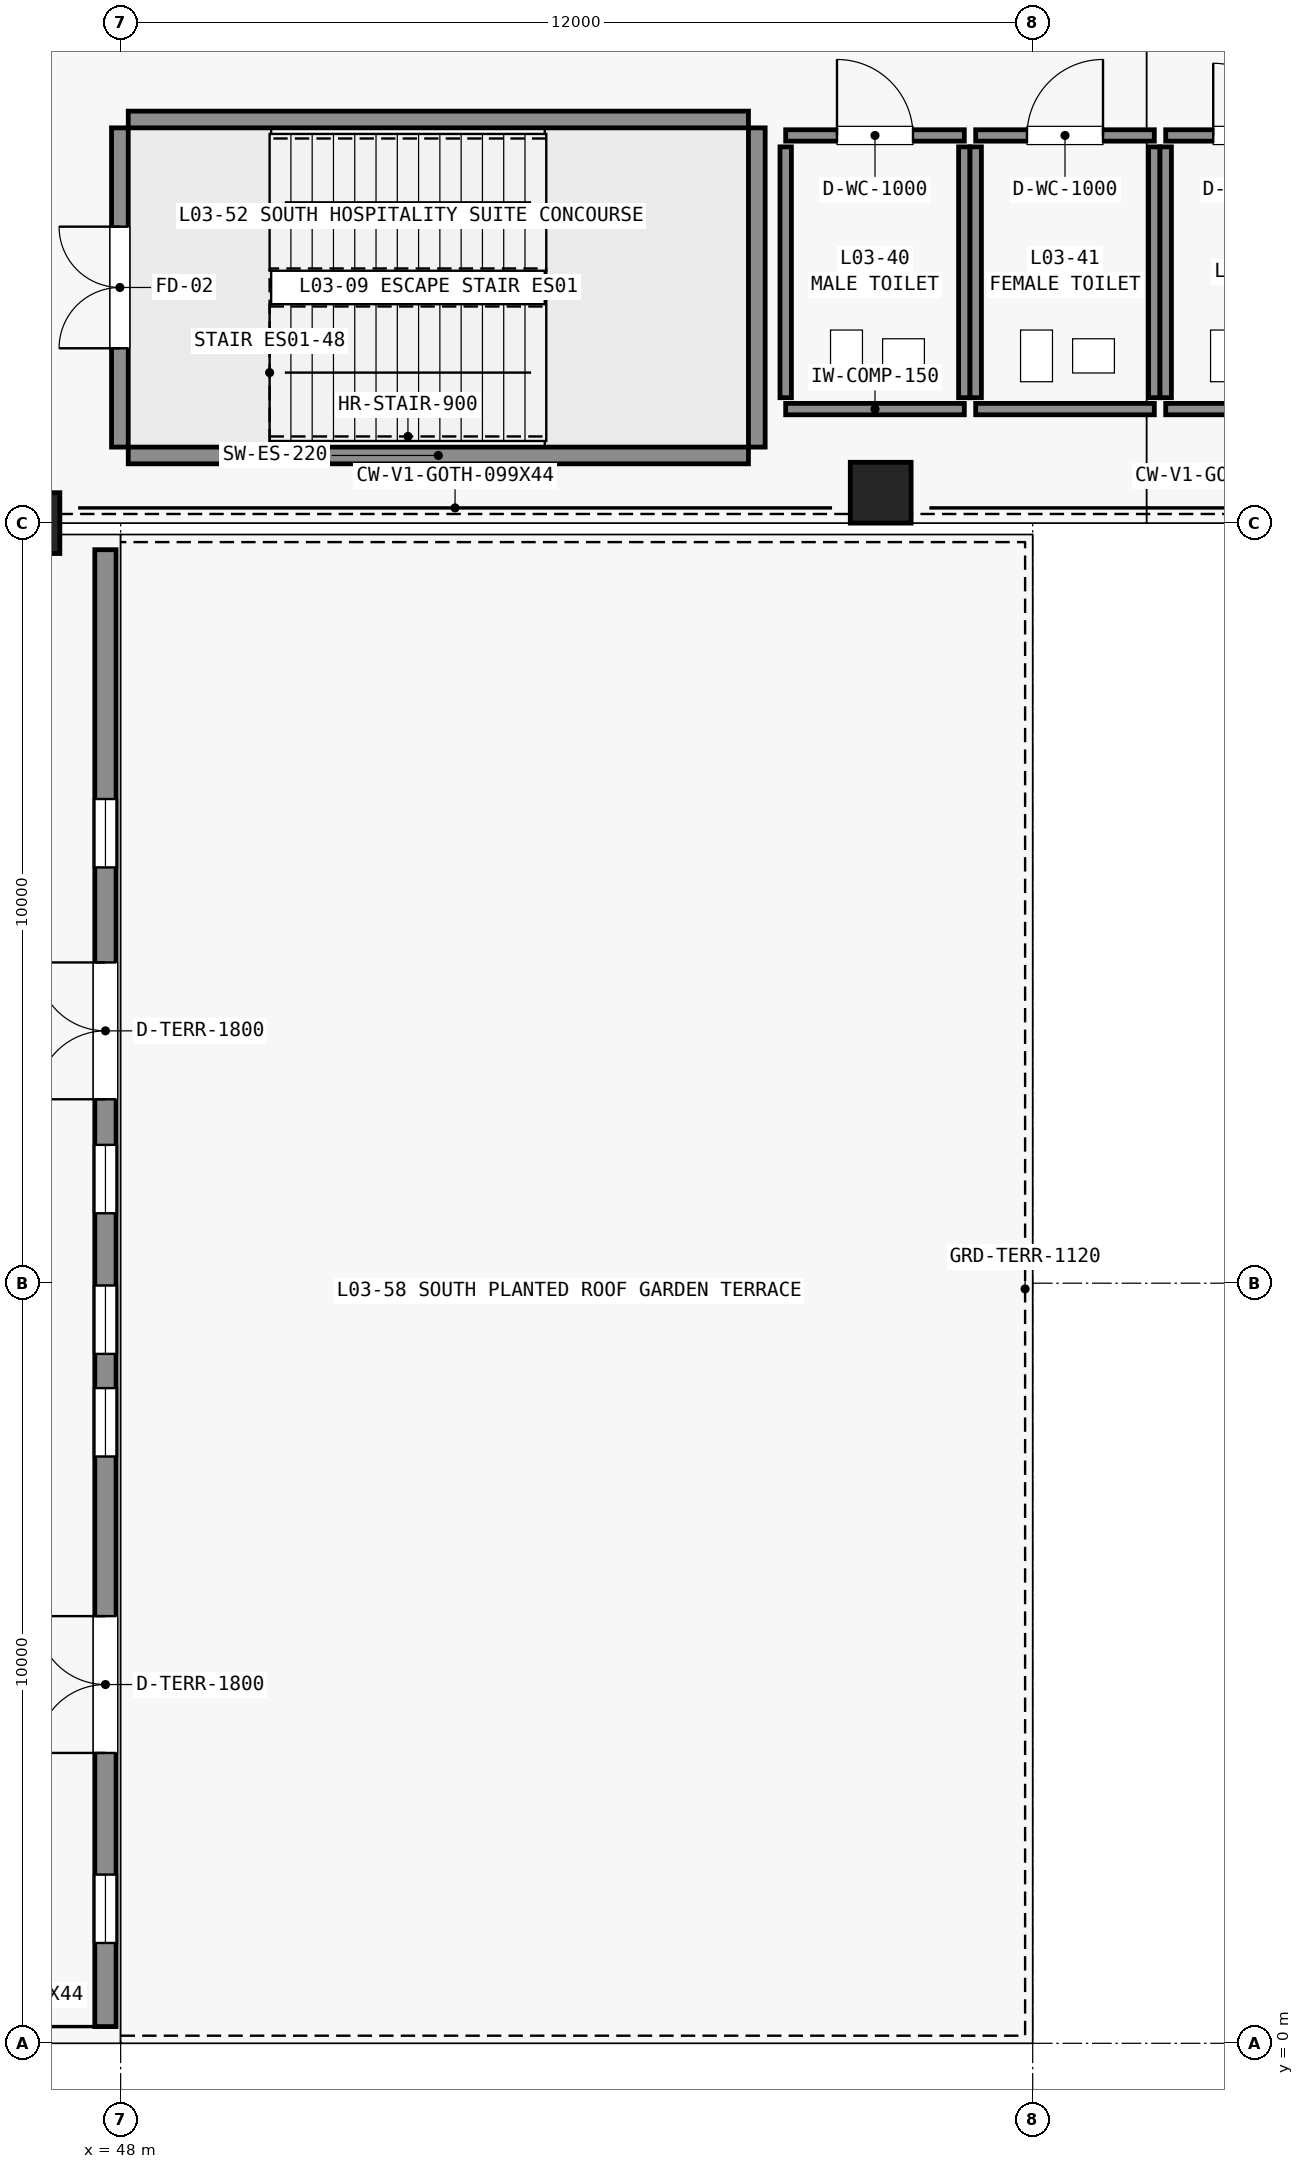
"""IFC4 building model, lengths in metres.
Left out: names, types, materials, properties, quantities, classifications, styles, units other than length and angle.
Written with IfcOpenShell. Run it as: python <this file> out.ifc"""

import sys

from ifc_helpers import new_model, si_unit, direction, frame, frame_2d, origin, origin_2d, place, context, subcontext, project, spatial, rectangle, extrude, element, fill, save


model = new_model("IFC4")
c1 = context("Model", 3, precision=1e-05, world=origin(), true_north=direction((0.0, 1.0)))
c2 = subcontext(c1, "Body", "Model", "MODEL_VIEW")
j1 = project(units=[si_unit("LENGTHUNIT", "METRE"), si_unit("PLANEANGLEUNIT", "RADIAN")], contexts=[c1])
p1 = place(None, origin())
s1 = spatial("IfcSite", under=j1, at=p1, CompositionType="ELEMENT")
p2 = place(p1, origin())
s2 = spatial("IfcBuilding", under=s1, at=p2, CompositionType="ELEMENT")
p3 = place(p2, frame((0.0, 0.0, 16.2)))
s3 = spatial("IfcBuildingStorey", under=s2, at=p3, CompositionType="ELEMENT", Elevation=16.2)
p4 = place(p3, frame((58.0, 20.4, 0.0), z_axis=(0.0, 0.0, 1.0), x_axis=(1.0, 0.0, 0.0)))
e1 = element("IfcColumn", 1, at=p4, inside=s3, PredefinedType="PILASTER", context=c2, shape_type="SweptSolid", body=[
    extrude(rectangle(XDim=0.8, YDim=0.8, at=origin_2d()), origin(), (0.0, 0.0, 1.0), 4.8),
])
p5 = place(p3, frame((46.8, 20.0, 0.0), z_axis=(0.0, 0.0, 1.0), x_axis=(1.0, 0.0, 0.0)))
e2 = element("IfcColumn", 2, at=p5, inside=s3, PredefinedType="PILASTER", context=c2, shape_type="SweptSolid", body=[
    extrude(rectangle(XDim=0.8, YDim=0.8, at=origin_2d()), origin(), (0.0, 0.0, 1.0), 4.44),
])
p6 = place(p3, frame((47.8, 0.22, 0.0), z_axis=(0.0, 0.0, 1.0), x_axis=(0.0, 1.0, 0.0)))
e3 = element("IfcWall", 3, at=p6, inside=s3, PredefinedType="STANDARD", context=c2, shape_type="SweptSolid", body=[
    extrude(rectangle(XDim=19.43, YDim=0.28, at=frame_2d((9.715, 0.0))), origin(), (0.0, 0.0, 1.0), 4.44),
])
p7 = place(p6, frame((3.6, 0.0, 0.0)))
e4 = element("IfcOpeningElement", 4, at=p7, cuts=e3, PredefinedType="OPENING", context=c2, shape_type="SweptSolid", body=[
    extrude(rectangle(XDim=1.8, YDim=2.3, at=frame_2d((0.9, 1.15))), frame((0.0, 0.15, 0.0), z_axis=(0.0, -1.0, 0.0), x_axis=(1.0, 0.0, 0.0)), (0.0, 0.0, 1.0), 0.3),
])
p8 = place(p6, frame((12.2, 0.0, 0.0)))
e5 = element("IfcOpeningElement", 5, at=p8, cuts=e3, PredefinedType="OPENING", context=c2, shape_type="SweptSolid", body=[
    extrude(rectangle(XDim=1.8, YDim=2.3, at=frame_2d((0.9, 1.15))), frame((0.0, 0.15, 0.0), z_axis=(0.0, -1.0, 0.0), x_axis=(1.0, 0.0, 0.0)), (0.0, 0.0, 1.0), 0.3),
])
p9 = place(p6, frame((1.1, 0.0, 0.95)))
e6 = element("IfcOpeningElement", 6, at=p9, cuts=e3, PredefinedType="OPENING", context=c2, shape_type="SweptSolid", body=[
    extrude(rectangle(XDim=0.9, YDim=2.85, at=frame_2d((0.45, 1.425))), frame((0.0, 0.15, 0.0), z_axis=(0.0, -1.0, 0.0), x_axis=(1.0, 0.0, 0.0)), (0.0, 0.0, 1.0), 0.3),
])
p10 = place(p6, frame((7.5, 0.0, 0.95)))
e7 = element("IfcOpeningElement", 7, at=p10, cuts=e3, PredefinedType="OPENING", context=c2, shape_type="SweptSolid", body=[
    extrude(rectangle(XDim=0.9, YDim=2.85, at=frame_2d((0.45, 1.425))), frame((0.0, 0.15, 0.0), z_axis=(0.0, -1.0, 0.0), x_axis=(1.0, 0.0, 0.0)), (0.0, 0.0, 1.0), 0.3),
])
p11 = place(p6, frame((8.85, 0.0, 0.95)))
e8 = element("IfcOpeningElement", 8, at=p11, cuts=e3, PredefinedType="OPENING", context=c2, shape_type="SweptSolid", body=[
    extrude(rectangle(XDim=0.9, YDim=2.85, at=frame_2d((0.45, 1.425))), frame((0.0, 0.15, 0.0), z_axis=(0.0, -1.0, 0.0), x_axis=(1.0, 0.0, 0.0)), (0.0, 0.0, 1.0), 0.3),
])
p12 = place(p6, frame((10.7, 0.0, 0.95)))
e9 = element("IfcOpeningElement", 9, at=p12, cuts=e3, PredefinedType="OPENING", context=c2, shape_type="SweptSolid", body=[
    extrude(rectangle(XDim=0.9, YDim=2.85, at=frame_2d((0.45, 1.425))), frame((0.0, 0.15, 0.0), z_axis=(0.0, -1.0, 0.0), x_axis=(1.0, 0.0, 0.0)), (0.0, 0.0, 1.0), 0.3),
])
p13 = place(p6, frame((15.25, 0.0, 0.95)))
e10 = element("IfcOpeningElement", 10, at=p13, cuts=e3, PredefinedType="OPENING", context=c2, shape_type="SweptSolid", body=[
    extrude(rectangle(XDim=0.9, YDim=2.85, at=frame_2d((0.45, 1.425))), frame((0.0, 0.15, 0.0), z_axis=(0.0, -1.0, 0.0), x_axis=(1.0, 0.0, 0.0)), (0.0, 0.0, 1.0), 0.3),
])
for number, where, z_axis, x_axis in (
    (11, (48.1, 20.89, 0.0), (0.0, 0.0, 1.0), (1.0, 0.0, 0.0)),
    (12, (48.1, 25.31, 0.0), (0.0, 0.0, 1.0), (1.0, 0.0, 0.0)),
):
    element("IfcWall", number, at=place(p3, frame(where, z_axis=z_axis, x_axis=x_axis)), inside=s3, PredefinedType="SHEAR", context=c2, shape_type="SweptSolid", body=[
        extrude(rectangle(XDim=8.16, YDim=0.22, at=frame_2d((4.08, 0.0))), origin(), (0.0, 0.0, 1.0), 4.8),
    ])
p14 = place(p3, frame((47.99, 21.0, 0.0), z_axis=(0.0, 0.0, 1.0), x_axis=(0.0, 1.0, 0.0)))
e13 = element("IfcWall", 13, at=p14, inside=s3, PredefinedType="SHEAR", context=c2, shape_type="SweptSolid", body=[
    extrude(rectangle(XDim=4.2, YDim=0.22, at=frame_2d((2.1, 0.0))), origin(), (0.0, 0.0, 1.0), 4.8),
])
p15 = place(p14, frame((1.3, 0.0, 0.0)))
e14 = element("IfcOpeningElement", 14, at=p15, cuts=e13, PredefinedType="OPENING", context=c2, shape_type="SweptSolid", body=[
    extrude(rectangle(XDim=1.6, YDim=2.2, at=frame_2d((0.8, 1.1))), frame((0.0, 0.12, 0.0), z_axis=(0.0, -1.0, 0.0), x_axis=(1.0, 0.0, 0.0)), (0.0, 0.0, 1.0), 0.24),
])
p16 = place(p3, frame((56.37, 21.0, 0.0), z_axis=(0.0, 0.0, 1.0), x_axis=(0.0, 1.0, 0.0)))
e15 = element("IfcWall", 15, at=p16, inside=s3, PredefinedType="SHEAR", context=c2, shape_type="SweptSolid", body=[
    extrude(rectangle(XDim=4.2, YDim=0.22, at=frame_2d((2.1, 0.0))), origin(), (0.0, 0.0, 1.0), 4.8),
])
p17 = place(p3, frame((56.75, 21.5, 0.0), z_axis=(0.0, 0.0, 1.0), x_axis=(1.0, 0.0, 0.0)))
e16 = element("IfcWall", 16, at=p17, inside=s3, PredefinedType="STANDARD", context=c2, shape_type="SweptSolid", body=[
    extrude(rectangle(XDim=2.35, YDim=0.15, at=frame_2d((1.175, 0.0))), origin(), (0.0, 0.0, 1.0), 4.44),
])
p18 = place(p3, frame((56.75, 25.1, 0.0), z_axis=(0.0, 0.0, 1.0), x_axis=(1.0, 0.0, 0.0)))
e17 = element("IfcWall", 17, at=p18, inside=s3, PredefinedType="STANDARD", context=c2, shape_type="SweptSolid", body=[
    extrude(rectangle(XDim=2.35, YDim=0.15, at=frame_2d((1.175, 0.0))), origin(), (0.0, 0.0, 1.0), 4.44),
])
p19 = place(p18, frame((0.675, 0.0, 0.0)))
e18 = element("IfcOpeningElement", 18, at=p19, cuts=e17, PredefinedType="OPENING", context=c2, shape_type="SweptSolid", body=[
    extrude(rectangle(XDim=1.0, YDim=2.15, at=frame_2d((0.5, 1.075))), frame((0.0, 0.085, 0.0), z_axis=(0.0, -1.0, 0.0), x_axis=(1.0, 0.0, 0.0)), (0.0, 0.0, 1.0), 0.17),
])
for number, where, z_axis, x_axis in (
    (19, (56.75, 21.65, 0.0), (0.0, 0.0, 1.0), (0.0, 1.0, 0.0)),
    (20, (59.1, 21.65, 0.0), (0.0, 0.0, 1.0), (0.0, 1.0, 0.0)),
):
    element("IfcWall", number, at=place(p3, frame(where, z_axis=z_axis, x_axis=x_axis)), inside=s3, PredefinedType="STANDARD", context=c2, shape_type="SweptSolid", body=[
        extrude(rectangle(XDim=3.3, YDim=0.15, at=frame_2d((1.65, 0.0))), origin(), (0.0, 0.0, 1.0), 4.44),
    ])
p20 = place(p3, frame((59.25, 21.5, 0.0), z_axis=(0.0, 0.0, 1.0), x_axis=(1.0, 0.0, 0.0)))
e21 = element("IfcWall", 21, at=p20, inside=s3, PredefinedType="STANDARD", context=c2, shape_type="SweptSolid", body=[
    extrude(rectangle(XDim=2.35, YDim=0.15, at=frame_2d((1.175, 0.0))), origin(), (0.0, 0.0, 1.0), 4.44),
])
p21 = place(p3, frame((59.25, 25.1, 0.0), z_axis=(0.0, 0.0, 1.0), x_axis=(1.0, 0.0, 0.0)))
e22 = element("IfcWall", 22, at=p21, inside=s3, PredefinedType="STANDARD", context=c2, shape_type="SweptSolid", body=[
    extrude(rectangle(XDim=2.35, YDim=0.15, at=frame_2d((1.175, 0.0))), origin(), (0.0, 0.0, 1.0), 4.44),
])
p22 = place(p21, frame((0.675, 0.0, 0.0)))
e23 = element("IfcOpeningElement", 23, at=p22, cuts=e22, PredefinedType="OPENING", context=c2, shape_type="SweptSolid", body=[
    extrude(rectangle(XDim=1.0, YDim=2.15, at=frame_2d((0.5, 1.075))), frame((0.0, 0.085, 0.0), z_axis=(0.0, -1.0, 0.0), x_axis=(1.0, 0.0, 0.0)), (0.0, 0.0, 1.0), 0.17),
])
for number, where, z_axis, x_axis in (
    (24, (59.25, 21.65, 0.0), (0.0, 0.0, 1.0), (0.0, 1.0, 0.0)),
    (25, (61.6, 21.65, 0.0), (0.0, 0.0, 1.0), (0.0, 1.0, 0.0)),
):
    element("IfcWall", number, at=place(p3, frame(where, z_axis=z_axis, x_axis=x_axis)), inside=s3, PredefinedType="STANDARD", context=c2, shape_type="SweptSolid", body=[
        extrude(rectangle(XDim=3.3, YDim=0.15, at=frame_2d((1.65, 0.0))), origin(), (0.0, 0.0, 1.0), 4.44),
    ])
p23 = place(p3, frame((61.75, 21.5, 0.0), z_axis=(0.0, 0.0, 1.0), x_axis=(1.0, 0.0, 0.0)))
e26 = element("IfcWall", 26, at=p23, inside=s3, PredefinedType="STANDARD", context=c2, shape_type="SweptSolid", body=[
    extrude(rectangle(XDim=2.2, YDim=0.15, at=frame_2d((1.1, 0.0))), origin(), (0.0, 0.0, 1.0), 4.44),
])
p24 = place(p3, frame((61.75, 25.1, 0.0), z_axis=(0.0, 0.0, 1.0), x_axis=(1.0, 0.0, 0.0)))
e27 = element("IfcWall", 27, at=p24, inside=s3, PredefinedType="STANDARD", context=c2, shape_type="SweptSolid", body=[
    extrude(rectangle(XDim=2.2, YDim=0.15, at=frame_2d((1.1, 0.0))), origin(), (0.0, 0.0, 1.0), 4.44),
])
p25 = place(p24, frame((0.625, 0.0, 0.0)))
e28 = element("IfcOpeningElement", 28, at=p25, cuts=e27, PredefinedType="OPENING", context=c2, shape_type="SweptSolid", body=[
    extrude(rectangle(XDim=0.95, YDim=2.15, at=frame_2d((0.475, 1.075))), frame((0.0, 0.085, 0.0), z_axis=(0.0, -1.0, 0.0), x_axis=(1.0, 0.0, 0.0)), (0.0, 0.0, 1.0), 0.17),
])
p26 = place(p3, frame((61.75, 21.65, 0.0), z_axis=(0.0, 0.0, 1.0), x_axis=(0.0, 1.0, 0.0)))
e29 = element("IfcWall", 29, at=p26, inside=s3, PredefinedType="STANDARD", context=c2, shape_type="SweptSolid", body=[
    extrude(rectangle(XDim=3.3, YDim=0.15, at=frame_2d((1.65, 0.0))), origin(), (0.0, 0.0, 1.0), 4.44),
])
p27 = place(p7, origin())
e30 = element("IfcDoor", 30, at=p27, inside=s3, OperationType="DOUBLE_DOOR_SINGLE_SWING", PredefinedType="DOOR", context=c2, shape_type="SweptSolid", body=[
    extrude(rectangle(XDim=1.8, YDim=2.3, at=frame_2d((0.9, 1.15))), frame((0.0, 0.025, 0.0), z_axis=(0.0, -1.0, 0.0), x_axis=(1.0, 0.0, 0.0)), (0.0, 0.0, 1.0), 0.05),
])
fill(e4, e30)
p28 = place(p8, origin())
e31 = element("IfcDoor", 31, at=p28, inside=s3, OperationType="DOUBLE_DOOR_SINGLE_SWING", PredefinedType="DOOR", context=c2, shape_type="SweptSolid", body=[
    extrude(rectangle(XDim=1.8, YDim=2.3, at=frame_2d((0.9, 1.15))), frame((0.0, 0.025, 0.0), z_axis=(0.0, -1.0, 0.0), x_axis=(1.0, 0.0, 0.0)), (0.0, 0.0, 1.0), 0.05),
])
fill(e5, e31)
p29 = place(p9, origin())
e32 = element("IfcWindow", 32, at=p29, inside=s3, PartitioningType="DOUBLE_PANEL_VERTICAL", PredefinedType="WINDOW", context=c2, shape_type="SweptSolid", body=[
    extrude(rectangle(XDim=0.9, YDim=2.85, at=frame_2d((0.45, 1.425))), frame((0.0, 0.03, 0.0), z_axis=(0.0, -1.0, 0.0), x_axis=(1.0, 0.0, 0.0)), (0.0, 0.0, 1.0), 0.06),
])
fill(e6, e32)
p30 = place(p10, origin())
e33 = element("IfcWindow", 33, at=p30, inside=s3, PartitioningType="DOUBLE_PANEL_VERTICAL", PredefinedType="WINDOW", context=c2, shape_type="SweptSolid", body=[
    extrude(rectangle(XDim=0.9, YDim=2.85, at=frame_2d((0.45, 1.425))), frame((0.0, 0.03, 0.0), z_axis=(0.0, -1.0, 0.0), x_axis=(1.0, 0.0, 0.0)), (0.0, 0.0, 1.0), 0.06),
])
fill(e7, e33)
p31 = place(p11, origin())
e34 = element("IfcWindow", 34, at=p31, inside=s3, PartitioningType="DOUBLE_PANEL_VERTICAL", PredefinedType="WINDOW", context=c2, shape_type="SweptSolid", body=[
    extrude(rectangle(XDim=0.9, YDim=2.85, at=frame_2d((0.45, 1.425))), frame((0.0, 0.03, 0.0), z_axis=(0.0, -1.0, 0.0), x_axis=(1.0, 0.0, 0.0)), (0.0, 0.0, 1.0), 0.06),
])
fill(e8, e34)
p32 = place(p12, origin())
e35 = element("IfcWindow", 35, at=p32, inside=s3, PartitioningType="DOUBLE_PANEL_VERTICAL", PredefinedType="WINDOW", context=c2, shape_type="SweptSolid", body=[
    extrude(rectangle(XDim=0.9, YDim=2.85, at=frame_2d((0.45, 1.425))), frame((0.0, 0.03, 0.0), z_axis=(0.0, -1.0, 0.0), x_axis=(1.0, 0.0, 0.0)), (0.0, 0.0, 1.0), 0.06),
])
fill(e9, e35)
p33 = place(p13, origin())
e36 = element("IfcWindow", 36, at=p33, inside=s3, PartitioningType="DOUBLE_PANEL_VERTICAL", PredefinedType="WINDOW", context=c2, shape_type="SweptSolid", body=[
    extrude(rectangle(XDim=0.9, YDim=2.85, at=frame_2d((0.45, 1.425))), frame((0.0, 0.03, 0.0), z_axis=(0.0, -1.0, 0.0), x_axis=(1.0, 0.0, 0.0)), (0.0, 0.0, 1.0), 0.06),
])
fill(e10, e36)
p34 = place(p15, origin())
e37 = element("IfcDoor", 37, at=p34, inside=s3, OperationType="DOUBLE_DOOR_SINGLE_SWING", PredefinedType="DOOR", context=c2, shape_type="SweptSolid", body=[
    extrude(rectangle(XDim=1.6, YDim=2.2, at=frame_2d((0.8, 1.1))), frame((0.0, 0.025, 0.0), z_axis=(0.0, -1.0, 0.0), x_axis=(1.0, 0.0, 0.0)), (0.0, 0.0, 1.0), 0.05),
])
fill(e14, e37)
p35 = place(p19, origin())
e38 = element("IfcDoor", 38, at=p35, inside=s3, OperationType="SINGLE_SWING_LEFT", PredefinedType="DOOR", context=c2, shape_type="SweptSolid", body=[
    extrude(rectangle(XDim=1.0, YDim=2.15, at=frame_2d((0.5, 1.075))), frame((0.0, 0.025, 0.0), z_axis=(0.0, -1.0, 0.0), x_axis=(1.0, 0.0, 0.0)), (0.0, 0.0, 1.0), 0.05),
])
fill(e18, e38)
p36 = place(p22, origin())
e39 = element("IfcDoor", 39, at=p36, inside=s3, OperationType="SINGLE_SWING_RIGHT", PredefinedType="DOOR", context=c2, shape_type="SweptSolid", body=[
    extrude(rectangle(XDim=1.0, YDim=2.15, at=frame_2d((0.5, 1.075))), frame((0.0, 0.025, 0.0), z_axis=(0.0, -1.0, 0.0), x_axis=(1.0, 0.0, 0.0)), (0.0, 0.0, 1.0), 0.05),
])
fill(e23, e39)
p37 = place(p25, origin())
e40 = element("IfcDoor", 40, at=p37, inside=s3, OperationType="SINGLE_SWING_LEFT", PredefinedType="DOOR", context=c2, shape_type="SweptSolid", body=[
    extrude(rectangle(XDim=0.95, YDim=2.15, at=frame_2d((0.475, 1.075))), frame((0.0, 0.025, 0.0), z_axis=(0.0, -1.0, 0.0), x_axis=(1.0, 0.0, 0.0)), (0.0, 0.0, 1.0), 0.05),
])
fill(e28, e40)
save(model, sys.argv[1])
